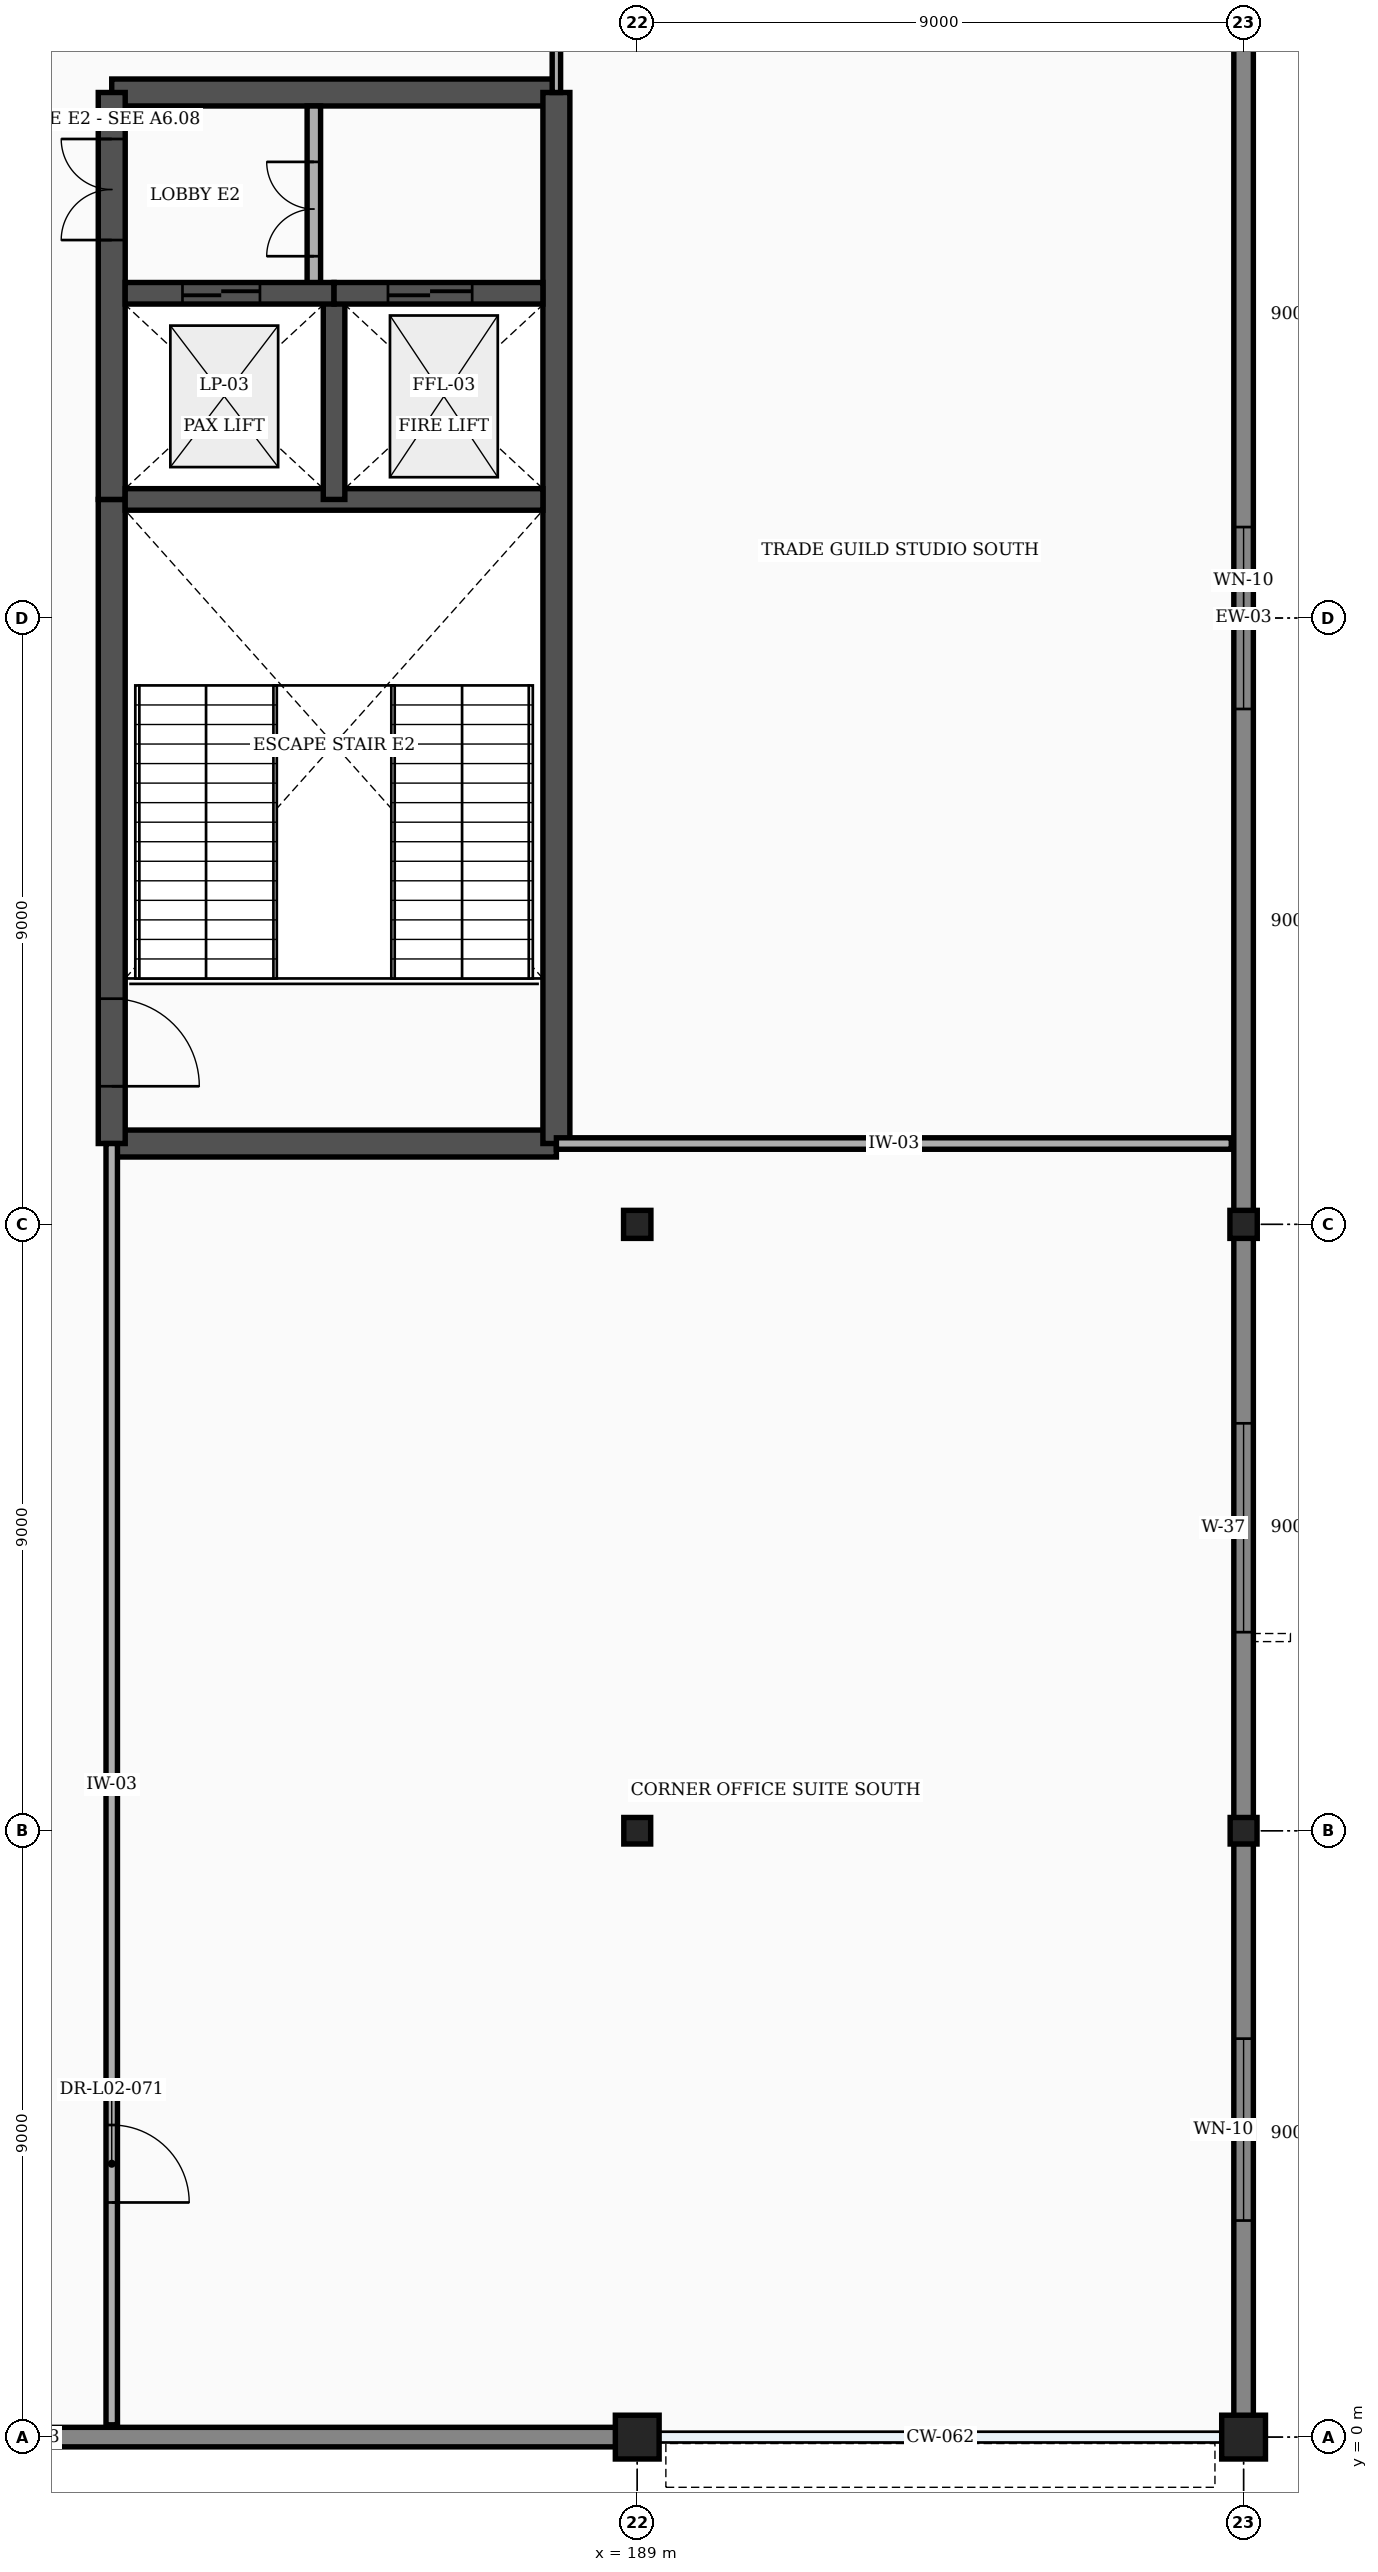
"""IFC4 building model, lengths in metres.
Left out: names, types, materials, properties, quantities, classifications, styles, units other than length and angle.
Written with IfcOpenShell. Run it as: python <this file> out.ifc"""

import sys

from ifc_helpers import new_model, si_unit, direction, frame, frame_2d, origin, origin_2d, place, context, subcontext, project, spatial, rectangle, i_section, extrude, element, fill, save


model = new_model("IFC4")
c1 = context("Model", 3, precision=1e-05, world=origin(), true_north=direction((0.0, 1.0)))
c2 = subcontext(c1, "Body", "Model", "MODEL_VIEW")
j1 = project(units=[si_unit("LENGTHUNIT", "METRE"), si_unit("PLANEANGLEUNIT", "RADIAN")], contexts=[c1])
p1 = place(None, origin())
s1 = spatial("IfcSite", under=j1, at=p1, CompositionType="ELEMENT")
p2 = place(p1, origin())
s2 = spatial("IfcBuilding", under=s1, at=p2, CompositionType="ELEMENT")
p3 = place(p2, frame((0.0, 0.0, 11.4)))
s3 = spatial("IfcBuildingStorey", under=s2, at=p3, CompositionType="ELEMENT", Elevation=11.4)
p4 = place(p3, frame((189.0, 0.0, 0.0), z_axis=(0.0, 0.0, 1.0), x_axis=(1.0, 0.0, 0.0)))
e1 = element("IfcColumn", 1, at=p4, inside=s3, PredefinedType="COLUMN", context=c2, shape_type="SweptSolid", body=[
    extrude(rectangle(XDim=0.65, YDim=0.65, at=origin_2d()), origin(), (0.0, 0.0, 1.0), 5.4),
])
p5 = place(p3, frame((189.0, 9.0, 0.0), z_axis=(0.0, 0.0, 1.0), x_axis=(1.0, 0.0, 0.0)))
e2 = element("IfcColumn", 2, at=p5, inside=s3, PredefinedType="COLUMN", context=c2, shape_type="SweptSolid", body=[
    extrude(i_section(OverallWidth=0.399, OverallDepth=0.394, WebThickness=0.023, FlangeThickness=0.037, at=origin_2d()), origin(), (0.0, 0.0, 1.0), 5.4),
])
p6 = place(p3, frame((189.0, 18.0, 0.0), z_axis=(0.0, 0.0, 1.0), x_axis=(1.0, 0.0, 0.0)))
e3 = element("IfcColumn", 3, at=p6, inside=s3, PredefinedType="COLUMN", context=c2, shape_type="SweptSolid", body=[
    extrude(i_section(OverallWidth=0.406, OverallDepth=0.416, WebThickness=0.03, FlangeThickness=0.048, at=origin_2d()), origin(), (0.0, 0.0, 1.0), 5.4),
])
p7 = place(p3, frame((198.0, 0.0, 0.0), z_axis=(0.0, 0.0, 1.0), x_axis=(1.0, 0.0, 0.0)))
e4 = element("IfcColumn", 4, at=p7, inside=s3, PredefinedType="COLUMN", context=c2, shape_type="SweptSolid", body=[
    extrude(rectangle(XDim=0.65, YDim=0.65, at=origin_2d()), origin(), (0.0, 0.0, 1.0), 5.4),
])
p8 = place(p3, frame((198.0, 9.0, 0.0), z_axis=(0.0, 0.0, 1.0), x_axis=(1.0, 0.0, 0.0)))
e5 = element("IfcColumn", 5, at=p8, inside=s3, PredefinedType="COLUMN", context=c2, shape_type="SweptSolid", body=[
    extrude(i_section(OverallWidth=0.399, OverallDepth=0.394, WebThickness=0.023, FlangeThickness=0.037, at=origin_2d()), origin(), (0.0, 0.0, 1.0), 5.4),
])
p9 = place(p3, frame((198.0, 18.0, 0.0), z_axis=(0.0, 0.0, 1.0), x_axis=(1.0, 0.0, 0.0)))
e6 = element("IfcColumn", 6, at=p9, inside=s3, PredefinedType="COLUMN", context=c2, shape_type="SweptSolid", body=[
    extrude(i_section(OverallWidth=0.406, OverallDepth=0.416, WebThickness=0.03, FlangeThickness=0.048, at=origin_2d()), origin(), (0.0, 0.0, 1.0), 5.4),
])
p10 = place(p3, frame((171.317, 0.0, 0.0), z_axis=(0.0, 0.0, 1.0), x_axis=(1.0, 0.0, 0.0)))
e7 = element("IfcWall", 7, at=p10, inside=s3, PredefinedType="STANDARD", context=c2, shape_type="SweptSolid", body=[
    extrude(rectangle(XDim=17.366, YDim=0.29, at=frame_2d((8.683, 0.0))), origin(), (0.0, 0.0, 1.0), 4.388),
])
p11 = place(p10, frame((0.65, 0.0, 0.85)))
e8 = element("IfcOpeningElement", 8, at=p11, cuts=e7, PredefinedType="OPENING", context=c2, shape_type="SweptSolid", body=[
    extrude(rectangle(XDim=2.7, YDim=2.4, at=frame_2d((1.35, 1.2))), frame((0.0, 0.157, 0.0), z_axis=(0.0, -1.0, 0.0), x_axis=(1.0, 0.0, 0.0)), (0.0, 0.0, 1.0), 0.314),
])
p12 = place(p3, frame((198.0, 0.317, 0.0), z_axis=(0.0, 0.0, 1.0), x_axis=(0.0, 1.0, 0.0)))
e9 = element("IfcWall", 9, at=p12, inside=s3, PredefinedType="STANDARD", context=c2, shape_type="SweptSolid", body=[
    extrude(rectangle(XDim=8.495, YDim=0.29, at=frame_2d((4.247, 0.0))), origin(), (0.0, 0.0, 1.0), 4.9),
])
p13 = place(p12, frame((2.897, 0.0, 0.85)))
e10 = element("IfcOpeningElement", 10, at=p13, cuts=e9, PredefinedType="OPENING", context=c2, shape_type="SweptSolid", body=[
    extrude(rectangle(XDim=2.7, YDim=2.4, at=frame_2d((1.35, 1.2))), frame((0.0, 0.157, 0.0), z_axis=(0.0, -1.0, 0.0), x_axis=(1.0, 0.0, 0.0)), (0.0, 0.0, 1.0), 0.314),
])
p14 = place(p3, frame((198.0, 9.188, 0.0), z_axis=(0.0, 0.0, 1.0), x_axis=(0.0, 1.0, 0.0)))
e11 = element("IfcWall", 11, at=p14, inside=s3, PredefinedType="STANDARD", context=c2, shape_type="SweptSolid", body=[
    extrude(rectangle(XDim=8.617, YDim=0.29, at=frame_2d((4.309, 0.0))), origin(), (0.0, 0.0, 1.0), 4.9),
])
p15 = place(p14, frame((2.759, 0.0, 0.85)))
e12 = element("IfcOpeningElement", 12, at=p15, cuts=e11, PredefinedType="OPENING", context=c2, shape_type="SweptSolid", body=[
    extrude(rectangle(XDim=3.1, YDim=2.0, at=frame_2d((1.55, 1.0))), frame((0.0, 0.157, 0.0), z_axis=(0.0, -1.0, 0.0), x_axis=(1.0, 0.0, 0.0)), (0.0, 0.0, 1.0), 0.314),
])
p16 = place(p3, frame((198.0, 18.194, 0.0), z_axis=(0.0, 0.0, 1.0), x_axis=(0.0, 1.0, 0.0)))
e13 = element("IfcWall", 13, at=p16, inside=s3, PredefinedType="STANDARD", context=c2, shape_type="SweptSolid", body=[
    extrude(rectangle(XDim=17.612, YDim=0.29, at=frame_2d((8.806, 0.0))), origin(), (0.0, 0.0, 1.0), 4.467),
])
p17 = place(p16, frame((7.456, 0.0, 0.85)))
e14 = element("IfcOpeningElement", 14, at=p17, cuts=e13, PredefinedType="OPENING", context=c2, shape_type="SweptSolid", body=[
    extrude(rectangle(XDim=2.7, YDim=2.4, at=frame_2d((1.35, 1.2))), frame((0.0, 0.157, 0.0), z_axis=(0.0, -1.0, 0.0), x_axis=(1.0, 0.0, 0.0)), (0.0, 0.0, 1.0), 0.314),
])
for number, where, z_axis, x_axis in (
    (15, (181.2, 19.2, 0.0), (0.0, 0.0, 1.0), (1.0, 0.0, 0.0)),
    (16, (181.2, 34.8, 0.0), (0.0, 0.0, 1.0), (1.0, 0.0, 0.0)),
):
    element("IfcWall", number, at=place(p3, frame(where, z_axis=z_axis, x_axis=x_axis)), inside=s3, PredefinedType="SHEAR", context=c2, shape_type="SweptSolid", body=[
        extrude(rectangle(XDim=6.6, YDim=0.4, at=frame_2d((3.3, 0.0))), origin(), (0.0, 0.0, 1.0), 5.15),
    ])
p18 = place(p3, frame((187.8, 19.2, 0.0), z_axis=(0.0, 0.0, 1.0), x_axis=(0.0, 1.0, 0.0)))
e17 = element("IfcWall", 17, at=p18, inside=s3, PredefinedType="SHEAR", context=c2, shape_type="SweptSolid", body=[
    extrude(rectangle(XDim=15.6, YDim=0.4, at=frame_2d((7.8, 0.0))), origin(), (0.0, 0.0, 1.0), 5.15),
])
p19 = place(p3, frame((181.2, 19.2, 0.0), z_axis=(0.0, 0.0, 1.0), x_axis=(0.0, 1.0, 0.0)))
e18 = element("IfcWall", 18, at=p19, inside=s3, PredefinedType="SHEAR", context=c2, shape_type="SweptSolid", body=[
    extrude(rectangle(XDim=9.56, YDim=0.4, at=frame_2d((4.78, 0.0))), origin(), (0.0, 0.0, 1.0), 5.15),
])
p20 = place(p19, frame((0.85, 0.0, 0.0)))
e19 = element("IfcOpeningElement", 19, at=p20, cuts=e18, PredefinedType="OPENING", context=c2, shape_type="SweptSolid", body=[
    extrude(rectangle(XDim=1.3, YDim=2.2, at=frame_2d((0.65, 1.1))), frame((0.0, 0.212, 0.0), z_axis=(0.0, -1.0, 0.0), x_axis=(1.0, 0.0, 0.0)), (0.0, 0.0, 1.0), 0.424),
])
p21 = place(p3, frame((181.2, 28.76, 0.0), z_axis=(0.0, 0.0, 1.0), x_axis=(0.0, 1.0, 0.0)))
e20 = element("IfcWall", 20, at=p21, inside=s3, PredefinedType="SHEAR", context=c2, shape_type="SweptSolid", body=[
    extrude(rectangle(XDim=6.04, YDim=0.4, at=frame_2d((3.02, 0.0))), origin(), (0.0, 0.0, 1.0), 5.15),
])
p22 = place(p21, frame((3.85, 0.0, 0.0)))
e21 = element("IfcOpeningElement", 21, at=p22, cuts=e20, PredefinedType="OPENING", context=c2, shape_type="SweptSolid", body=[
    extrude(rectangle(XDim=1.5, YDim=2.2, at=frame_2d((0.75, 1.1))), frame((0.0, 0.212, 0.0), z_axis=(0.0, -1.0, 0.0), x_axis=(1.0, 0.0, 0.0)), (0.0, 0.0, 1.0), 0.424),
])
p23 = place(p3, frame((181.4, 28.76, 0.0), z_axis=(0.0, 0.0, 1.0), x_axis=(1.0, 0.0, 0.0)))
e22 = element("IfcWall", 22, at=p23, inside=s3, PredefinedType="SHEAR", context=c2, shape_type="SweptSolid", body=[
    extrude(rectangle(XDim=6.2, YDim=0.32, at=frame_2d((3.1, 0.0))), origin(), (0.0, 0.0, 1.0), 5.15),
])
p24 = place(p3, frame((184.5, 28.76, 0.0), z_axis=(0.0, 0.0, 1.0), x_axis=(0.0, 1.0, 0.0)))
e23 = element("IfcWall", 23, at=p24, inside=s3, PredefinedType="SHEAR", context=c2, shape_type="SweptSolid", body=[
    extrude(rectangle(XDim=3.06, YDim=0.32, at=frame_2d((1.53, 0.0))), origin(), (0.0, 0.0, 1.0), 5.15),
])
p25 = place(p3, frame((184.2, 31.82, 0.0), z_axis=(0.0, 0.0, 1.0), x_axis=(0.0, 1.0, 0.0)))
e24 = element("IfcWall", 24, at=p25, inside=s3, PredefinedType="PARTITIONING", context=c2, shape_type="SweptSolid", body=[
    extrude(rectangle(XDim=2.78, YDim=0.2, at=frame_2d((1.39, 0.0))), origin(), (0.0, 0.0, 1.0), 5.15),
])
p26 = place(p25, frame((0.55, 0.0, 0.0)))
e25 = element("IfcOpeningElement", 25, at=p26, cuts=e24, PredefinedType="OPENING", context=c2, shape_type="SweptSolid", body=[
    extrude(rectangle(XDim=1.4, YDim=2.25, at=frame_2d((0.7, 1.125))), frame((0.0, 0.112, 0.0), z_axis=(0.0, -1.0, 0.0), x_axis=(1.0, 0.0, 0.0)), (0.0, 0.0, 1.0), 0.224),
])
p27 = place(p3, frame((181.4, 31.82, 0.0), z_axis=(0.0, 0.0, 1.0), x_axis=(1.0, 0.0, 0.0)))
e26 = element("IfcWall", 26, at=p27, inside=s3, PredefinedType="SHEAR", context=c2, shape_type="SweptSolid", body=[
    extrude(rectangle(XDim=3.1, YDim=0.32, at=frame_2d((1.55, 0.0))), origin(), (0.0, 0.0, 1.0), 5.15),
])
p28 = place(p27, frame((0.85, 0.0, 0.0)))
e27 = element("IfcOpeningElement", 27, at=p28, cuts=e26, PredefinedType="OPENING", context=c2, shape_type="SweptSolid", body=[
    extrude(rectangle(XDim=1.15, YDim=2.2, at=frame_2d((0.575, 1.1))), frame((0.0, 0.172, 0.0), z_axis=(0.0, -1.0, 0.0), x_axis=(1.0, 0.0, 0.0)), (0.0, 0.0, 1.0), 0.344),
])
p29 = place(p3, frame((184.5, 31.82, 0.0), z_axis=(0.0, 0.0, 1.0), x_axis=(1.0, 0.0, 0.0)))
e28 = element("IfcWall", 28, at=p29, inside=s3, PredefinedType="SHEAR", context=c2, shape_type="SweptSolid", body=[
    extrude(rectangle(XDim=3.1, YDim=0.32, at=frame_2d((1.55, 0.0))), origin(), (0.0, 0.0, 1.0), 5.15),
])
p30 = place(p29, frame((0.8, 0.0, 0.0)))
e29 = element("IfcOpeningElement", 29, at=p30, cuts=e28, PredefinedType="OPENING", context=c2, shape_type="SweptSolid", body=[
    extrude(rectangle(XDim=1.25, YDim=2.25, at=frame_2d((0.625, 1.125))), frame((0.0, 0.172, 0.0), z_axis=(0.0, -1.0, 0.0), x_axis=(1.0, 0.0, 0.0)), (0.0, 0.0, 1.0), 0.344),
])
p31 = place(p3, frame((187.8, 34.8, 0.0), z_axis=(0.0, 0.0, 1.0), x_axis=(0.0, 1.0, 0.0)))
e30 = element("IfcWall", 30, at=p31, inside=s3, PredefinedType="PARTITIONING", context=c2, shape_type="SweptSolid", body=[
    extrude(rectangle(XDim=2.0, YDim=0.125, at=frame_2d((1.0, 0.0))), origin(), (0.0, 0.0, 1.0), 5.15),
])
p32 = place(p3, frame((187.8, 19.2, 0.0), z_axis=(0.0, 0.0, 1.0), x_axis=(1.0, 0.0, 0.0)))
e31 = element("IfcWall", 31, at=p32, inside=s3, PredefinedType="PARTITIONING", context=c2, shape_type="SweptSolid", body=[
    extrude(rectangle(XDim=10.017, YDim=0.17, at=frame_2d((5.009, 0.0))), origin(), (0.0, 0.0, 1.0), 5.15),
])
p33 = place(p3, frame((181.2, 0.183, 0.0), z_axis=(0.0, 0.0, 1.0), x_axis=(0.0, 1.0, 0.0)))
e32 = element("IfcWall", 32, at=p33, inside=s3, PredefinedType="PARTITIONING", context=c2, shape_type="SweptSolid", body=[
    extrude(rectangle(XDim=19.017, YDim=0.17, at=frame_2d((9.509, 0.0))), origin(), (0.0, 0.0, 1.0), 5.15),
])
p34 = place(p33, frame((3.3, 0.0, 0.0)))
e33 = element("IfcOpeningElement", 33, at=p34, cuts=e32, PredefinedType="OPENING", context=c2, shape_type="SweptSolid", body=[
    extrude(rectangle(XDim=1.15, YDim=2.15, at=frame_2d((0.575, 1.075))), frame((0.0, 0.097, 0.0), z_axis=(0.0, -1.0, 0.0), x_axis=(1.0, 0.0, 0.0)), (0.0, 0.0, 1.0), 0.194),
])
p35 = place(p13, origin())
e34 = element("IfcWindow", 34, at=p35, inside=s3, PartitioningType="SINGLE_PANEL", PredefinedType="WINDOW", context=c2, shape_type="SweptSolid", body=[
    extrude(rectangle(XDim=2.7, YDim=2.4, at=frame_2d((1.35, 1.2))), frame((0.0, 0.03, 0.0), z_axis=(0.0, -1.0, 0.0), x_axis=(1.0, 0.0, 0.0)), (0.0, 0.0, 1.0), 0.06),
])
fill(e10, e34)
p36 = place(p15, origin())
e35 = element("IfcWindow", 35, at=p36, inside=s3, PartitioningType="SINGLE_PANEL", PredefinedType="WINDOW", context=c2, shape_type="SweptSolid", body=[
    extrude(rectangle(XDim=3.1, YDim=2.0, at=frame_2d((1.55, 1.0))), frame((0.0, 0.03, 0.0), z_axis=(0.0, -1.0, 0.0), x_axis=(1.0, 0.0, 0.0)), (0.0, 0.0, 1.0), 0.06),
])
fill(e12, e35)
p37 = place(p17, origin())
e36 = element("IfcWindow", 36, at=p37, inside=s3, PartitioningType="SINGLE_PANEL", PredefinedType="WINDOW", context=c2, shape_type="SweptSolid", body=[
    extrude(rectangle(XDim=2.7, YDim=2.4, at=frame_2d((1.35, 1.2))), frame((0.0, 0.03, 0.0), z_axis=(0.0, -1.0, 0.0), x_axis=(1.0, 0.0, 0.0)), (0.0, 0.0, 1.0), 0.06),
])
fill(e14, e36)
p38 = place(p20, frame((1.3, 0.0, 0.0), z_axis=(0.0, 0.0, 1.0), x_axis=(-1.0, 0.0, 0.0)))
e37 = element("IfcDoor", 37, at=p38, inside=s3, OperationType="SINGLE_SWING_RIGHT", PredefinedType="DOOR", context=c2, shape_type="SweptSolid", body=[
    extrude(rectangle(XDim=1.3, YDim=2.2, at=frame_2d((0.65, 1.1))), frame((0.0, 0.025, 0.0), z_axis=(0.0, -1.0, 0.0), x_axis=(1.0, 0.0, 0.0)), (0.0, 0.0, 1.0), 0.05),
])
fill(e19, e37)
p39 = place(p22, origin())
e38 = element("IfcDoor", 38, at=p39, inside=s3, OperationType="DOUBLE_DOOR_SINGLE_SWING", PredefinedType="DOOR", context=c2, shape_type="SweptSolid", body=[
    extrude(rectangle(XDim=1.5, YDim=2.2, at=frame_2d((0.75, 1.1))), frame((0.0, 0.025, 0.0), z_axis=(0.0, -1.0, 0.0), x_axis=(1.0, 0.0, 0.0)), (0.0, 0.0, 1.0), 0.05),
])
fill(e21, e38)
p40 = place(p26, origin())
e39 = element("IfcDoor", 39, at=p40, inside=s3, OperationType="DOUBLE_DOOR_SINGLE_SWING", PredefinedType="DOOR", context=c2, shape_type="SweptSolid", body=[
    extrude(rectangle(XDim=1.4, YDim=2.25, at=frame_2d((0.7, 1.125))), frame((0.0, 0.025, 0.0), z_axis=(0.0, -1.0, 0.0), x_axis=(1.0, 0.0, 0.0)), (0.0, 0.0, 1.0), 0.05),
])
fill(e25, e39)
p41 = place(p28, origin())
e40 = element("IfcDoor", 40, at=p41, inside=s3, OperationType="DOUBLE_DOOR_SLIDING", PredefinedType="DOOR", context=c2, shape_type="SweptSolid", body=[
    extrude(rectangle(XDim=1.15, YDim=2.2, at=frame_2d((0.575, 1.1))), frame((0.0, 0.025, 0.0), z_axis=(0.0, -1.0, 0.0), x_axis=(1.0, 0.0, 0.0)), (0.0, 0.0, 1.0), 0.05),
])
fill(e27, e40)
p42 = place(p30, origin())
e41 = element("IfcDoor", 41, at=p42, inside=s3, OperationType="DOUBLE_DOOR_SLIDING", PredefinedType="DOOR", context=c2, shape_type="SweptSolid", body=[
    extrude(rectangle(XDim=1.25, YDim=2.25, at=frame_2d((0.625, 1.125))), frame((0.0, 0.025, 0.0), z_axis=(0.0, -1.0, 0.0), x_axis=(1.0, 0.0, 0.0)), (0.0, 0.0, 1.0), 0.05),
])
fill(e29, e41)
p43 = place(p34, frame((1.15, 0.0, 0.0), z_axis=(0.0, 0.0, 1.0), x_axis=(-1.0, 0.0, 0.0)))
e42 = element("IfcDoor", 42, at=p43, inside=s3, OperationType="SINGLE_SWING_RIGHT", PredefinedType="DOOR", context=c2, shape_type="SweptSolid", body=[
    extrude(rectangle(XDim=1.15, YDim=2.15, at=frame_2d((0.575, 1.075))), frame((0.0, 0.025, 0.0), z_axis=(0.0, -1.0, 0.0), x_axis=(1.0, 0.0, 0.0)), (0.0, 0.0, 1.0), 0.05),
])
fill(e33, e42)
save(model, sys.argv[1])
